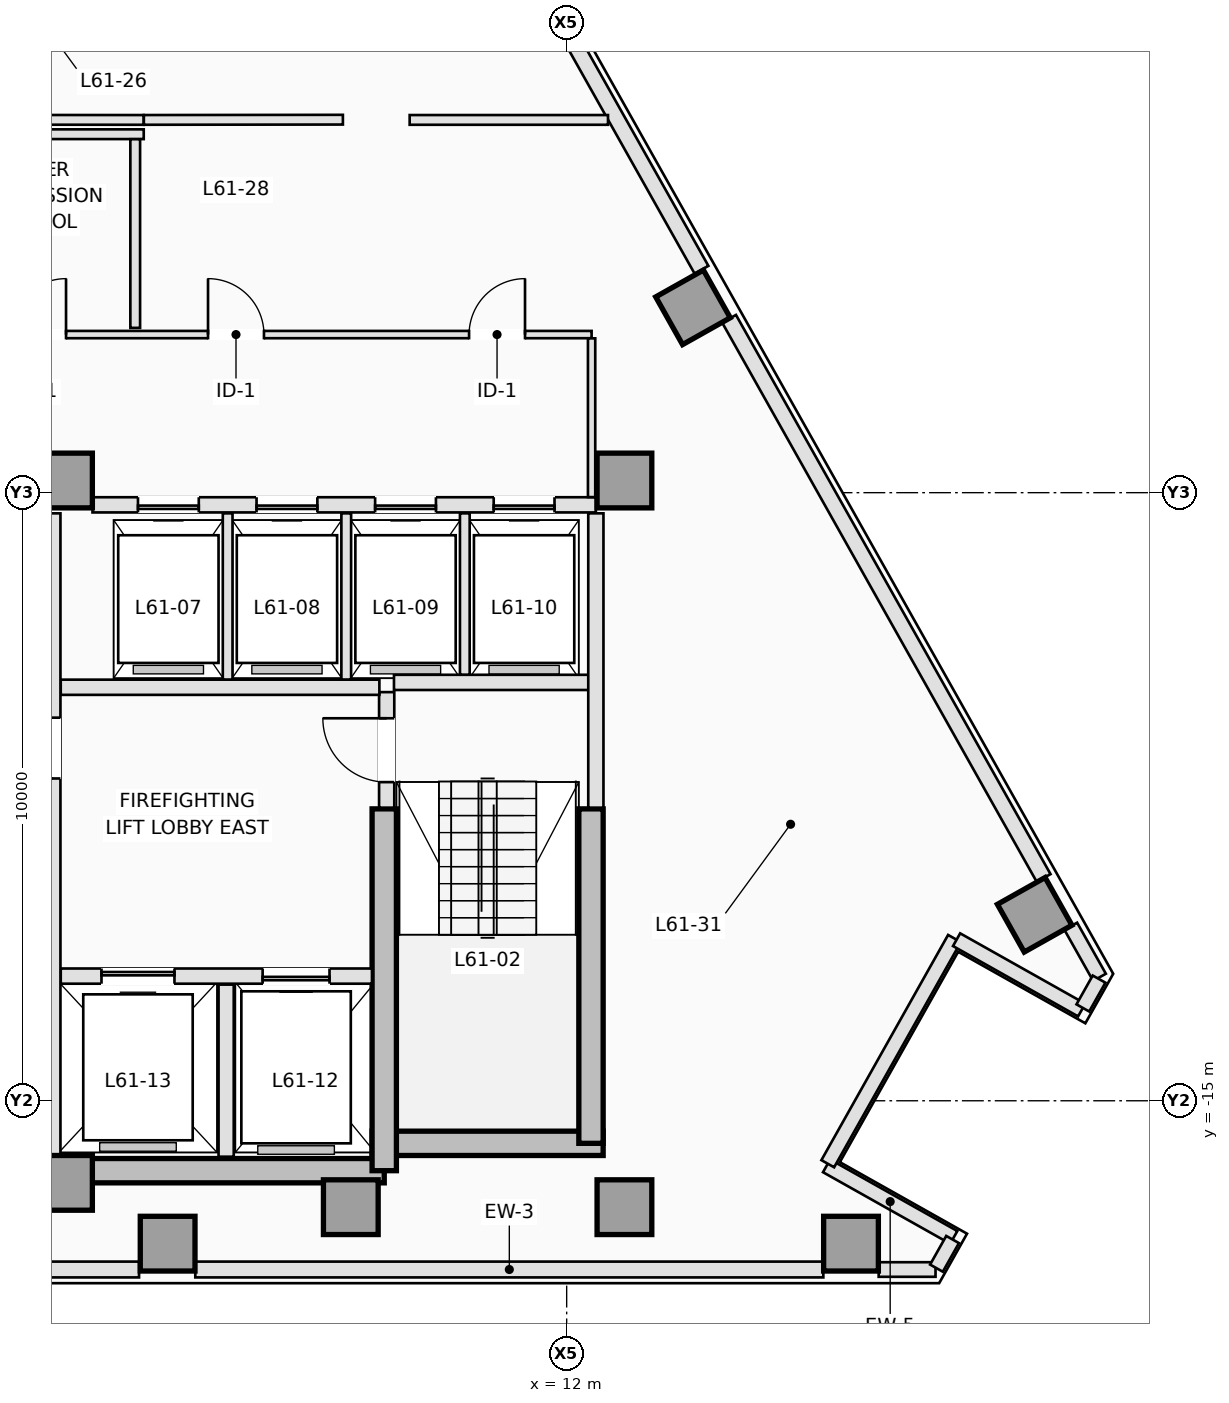
"""IFC4 building model, lengths in metres.
Left out: names, types, materials, properties, quantities, classifications, styles, units other than length and angle.
Written with IfcOpenShell. Run it as: python <this file> out.ifc"""

import sys

from ifc_helpers import new_model, si_unit, direction, frame, frame_2d, origin, origin_2d, place, context, subcontext, project, spatial, rectangle, extrude, element, fill, save


model = new_model("IFC4")
c1 = context("Model", 3, precision=1e-05, world=origin(), true_north=direction((0.0, 1.0)))
c2 = subcontext(c1, "Body", "Model", "MODEL_VIEW")
j1 = project(units=[si_unit("LENGTHUNIT", "METRE"), si_unit("PLANEANGLEUNIT", "RADIAN")], contexts=[c1])
p1 = place(None, origin())
s1 = spatial("IfcSite", under=j1, at=p1, CompositionType="ELEMENT")
p2 = place(p1, origin())
s2 = spatial("IfcBuilding", under=s1, at=p2, CompositionType="ELEMENT")
p3 = place(p2, frame((0.0, 0.0, 221.9)))
s3 = spatial("IfcBuildingStorey", under=s2, at=p3, CompositionType="ELEMENT", Elevation=221.9)
p4 = place(p3, frame((3.75, -16.15, 0.0), z_axis=(0.0, 0.0, 1.0), x_axis=(1.0, 0.0, 0.0)))
e1 = element("IfcWall", 1, at=p4, inside=s3, PredefinedType="SHEAR", context=c2, shape_type="SweptSolid", body=[
    extrude(rectangle(XDim=5.25, YDim=0.4, at=frame_2d((2.625, 0.0))), origin(), (0.0, 0.0, 1.0), 3.5),
])
p5 = place(p3, frame((8.8, -15.7, 0.0), z_axis=(0.0, 0.0, 1.0), x_axis=(1.0, 0.0, 0.0)))
e2 = element("IfcWall", 2, at=p5, inside=s3, PredefinedType="SHEAR", context=c2, shape_type="SweptSolid", body=[
    extrude(rectangle(XDim=3.8, YDim=0.4, at=frame_2d((1.9, 0.0))), origin(), (0.0, 0.0, 1.0), 3.5),
])
p6 = place(p3, frame((12.4, -15.7, 0.0), z_axis=(0.0, 0.0, 1.0), x_axis=(0.0, 1.0, 0.0)))
e3 = element("IfcWall", 3, at=p6, inside=s3, PredefinedType="SHEAR", context=c2, shape_type="SweptSolid", body=[
    extrude(rectangle(XDim=5.5, YDim=0.4, at=frame_2d((2.75, 0.0))), origin(), (0.0, 0.0, 1.0), 3.5),
])
p7 = place(p3, frame((9.0, -16.15, 0.0), z_axis=(0.0, 0.0, 1.0), x_axis=(0.0, 1.0, 0.0)))
e4 = element("IfcWall", 4, at=p7, inside=s3, PredefinedType="SHEAR", context=c2, shape_type="SweptSolid", body=[
    extrude(rectangle(XDim=5.95, YDim=0.4, at=frame_2d((2.975, 0.0))), origin(), (0.0, 0.0, 1.0), 3.5),
])
for number, where, z_axis, x_axis in (
    (5, (3.75, -16.35, 0.0), (0.0, 0.0, 1.0), (1.0, 0.0, 0.0)),
    (6, (8.45, -16.75, 0.0), (0.0, 0.0, 1.0), (1.0, 0.0, 0.0)),
    (7, (12.95, -16.75, 0.0), (0.0, 0.0, 1.0), (1.0, 0.0, 0.0)),
    (8, (3.75, -4.8, 0.0), (0.0, 0.0, 1.0), (1.0, 0.0, 0.0)),
    (9, (12.95, -4.8, 0.0), (0.0, 0.0, 1.0), (1.0, 0.0, 0.0)),
    (10, (5.438, -17.35, 0.0), (0.0, 0.0, 1.0), (0.0, 1.0, 0.0)),
    (11, (16.676, -17.35, 0.0), (0.0, 0.0, 1.0), (0.0, 1.0, 0.0)),
    (12, (19.697, -11.942, 0.0), (0.0, 0.0, 1.0), (0.872, 0.49, 0.0)),
    (13, (14.077, -1.952, 0.0), (0.0, 0.0, 1.0), (0.872, 0.49, 0.0)),
):
    element("IfcColumn", number, at=place(p3, frame(where, z_axis=z_axis, x_axis=x_axis)), inside=s3, PredefinedType="COLUMN", context=c2, shape_type="SweptSolid", body=[
        extrude(rectangle(XDim=0.9, YDim=0.9, at=origin_2d()), origin(), (0.0, 0.0, 1.0), 3.5),
    ])
p8 = place(p3, frame((18.066, -17.775, 0.0), z_axis=(0.0, 0.0, 1.0), x_axis=(-1.0, 0.0, 0.0)))
e14 = element("IfcWall", 14, at=p8, inside=s3, PredefinedType="STANDARD", context=c2, shape_type="SweptSolid", body=[
    extrude(rectangle(XDim=0.935, YDim=0.24, at=frame_2d((0.468, 0.0))), origin(), (0.0, 0.0, 1.0), 3.25),
])
p9 = place(p3, frame((16.221, -17.775, 0.0), z_axis=(0.0, 0.0, 1.0), x_axis=(-1.0, 0.0, 0.0)))
e15 = element("IfcWall", 15, at=p9, inside=s3, PredefinedType="STANDARD", context=c2, shape_type="SweptSolid", body=[
    extrude(rectangle(XDim=10.328, YDim=0.26, at=frame_2d((5.164, 0.0))), origin(), (0.0, 0.0, 1.0), 3.25),
])
p10 = place(p3, frame((4.968, -17.775, 0.0), z_axis=(0.0, 0.0, 1.0), x_axis=(-1.0, 0.0, 0.0)))
e16 = element("IfcWall", 16, at=p10, inside=s3, PredefinedType="STANDARD", context=c2, shape_type="SweptSolid", body=[
    extrude(rectangle(XDim=4.305, YDim=0.26, at=frame_2d((2.153, 0.0))), origin(), (0.0, 0.0, 1.0), 3.25),
])
p11 = place(p3, frame((20.29, -12.13, 0.0), z_axis=(0.0, 0.0, 1.0), x_axis=(0.490345412687, -0.87152818443, 0.0)))
e17 = element("IfcWall", 17, at=p11, inside=s3, PredefinedType="STANDARD", context=c2, shape_type="SweptSolid", body=[
    extrude(rectangle(XDim=0.964, YDim=0.24, at=frame_2d((0.482, 0.0))), origin(), (0.0, 0.0, 1.0), 3.25),
])
p12 = place(p3, frame((14.671, -2.14, 0.0), z_axis=(0.0, 0.0, 1.0), x_axis=(0.490246958575, -0.871583570066, 0.0)))
e18 = element("IfcWall", 18, at=p12, inside=s3, PredefinedType="STANDARD", context=c2, shape_type="SweptSolid", body=[
    extrude(rectangle(XDim=10.552, YDim=0.26, at=frame_2d((5.276, 0.0))), origin(), (0.0, 0.0, 1.0), 3.25),
])
p13 = place(p3, frame((12.066, 2.49, 0.0), z_axis=(0.0, 0.0, 1.0), x_axis=(0.490261239633, -0.871575537125, 0.0)))
e19 = element("IfcWall", 19, at=p13, inside=s3, PredefinedType="STANDARD", context=c2, shape_type="SweptSolid", body=[
    extrude(rectangle(XDim=4.388, YDim=0.26, at=frame_2d((2.194, 0.0))), origin(), (0.0, 0.0, 1.0), 3.25),
])
p14 = place(p3, frame((18.366, -17.247, 0.0), z_axis=(0.0, 0.0, 1.0), x_axis=(-0.871597270235, 0.490222600988, 0.0)))
e20 = element("IfcWall", 20, at=p14, inside=s3, PredefinedType="STANDARD", context=c2, shape_type="SweptSolid", body=[
    extrude(rectangle(XDim=2.4, YDim=0.24, at=frame_2d((1.2, 0.0))), origin(), (0.0, 0.0, 1.0), 3.25),
])
p15 = place(p3, frame((16.294, -16.035, 0.0), z_axis=(0.0, 0.0, 1.0), x_axis=(0.49027487746, 0.871567865706, 0.0)))
e21 = element("IfcWall", 21, at=p15, inside=s3, PredefinedType="STANDARD", context=c2, shape_type="SweptSolid", body=[
    extrude(rectangle(XDim=4.25, YDim=0.24, at=frame_2d((2.125, 0.0))), origin(), (0.0, 0.0, 1.0), 2.722),
])
p16 = place(p3, frame((18.412, -12.351, 0.0), z_axis=(0.0, 0.0, 1.0), x_axis=(0.871578299909, -0.490256327984, 0.0)))
e22 = element("IfcWall", 22, at=p16, inside=s3, PredefinedType="STANDARD", context=c2, shape_type="SweptSolid", body=[
    extrude(rectangle(XDim=2.36, YDim=0.24, at=frame_2d((1.18, 0.0))), origin(), (0.0, 0.0, 1.0), 3.25),
])
p17 = place(p3, frame((20.489, -13.473, 0.0), z_axis=(0.0, 0.0, 1.0), x_axis=(0.490133374867, 0.87164744871, 0.0)))
e23 = element("IfcWall", 23, at=p17, inside=s3, PredefinedType="STANDARD", context=c2, shape_type="SweptSolid", body=[
    extrude(rectangle(XDim=0.544, YDim=0.24, at=frame_2d((0.272, 0.0))), origin(), (0.0, 0.0, 1.0), 3.25),
])
p18 = place(p3, frame((18.081, -17.753, 0.0), z_axis=(0.0, 0.0, 1.0), x_axis=(0.490582915772, 0.871394516136, 0.0)))
e24 = element("IfcWall", 24, at=p18, inside=s3, PredefinedType="STANDARD", context=c2, shape_type="SweptSolid", body=[
    extrude(rectangle(XDim=0.541, YDim=0.24, at=frame_2d((0.27, 0.0))), origin(), (0.0, 0.0, 1.0), 3.25),
])
p19 = place(p3, frame((9.04, -10.18, 0.0), z_axis=(0.0, 0.0, 1.0), x_axis=(0.0, 1.0, 0.0)))
e25 = element("IfcWall", 25, at=p19, inside=s3, PredefinedType="PARTITIONING", context=c2, shape_type="SweptSolid", body=[
    extrude(rectangle(XDim=1.9, YDim=0.25, at=frame_2d((0.95, 0.0))), origin(), (0.0, 0.0, 1.0), 3.25),
])
p20 = place(p19, frame((0.42, 0.0, 0.0)))
e26 = element("IfcOpeningElement", 26, at=p20, cuts=e25, PredefinedType="OPENING", context=c2, shape_type="SweptSolid", body=[
    extrude(rectangle(XDim=1.05, YDim=2.15, at=frame_2d((0.525, 1.075))), frame((0.0, 0.135, 0.0), z_axis=(0.0, -1.0, 0.0), x_axis=(1.0, 0.0, 0.0)), (0.0, 0.0, 1.0), 0.27),
])
p21 = place(p3, frame((9.16, -8.12, 0.0), z_axis=(0.0, 0.0, 1.0), x_axis=(1.0, 0.0, 0.0)))
e27 = element("IfcWall", 27, at=p21, inside=s3, PredefinedType="PARTITIONING", context=c2, shape_type="SweptSolid", body=[
    extrude(rectangle(XDim=3.22, YDim=0.25, at=frame_2d((1.61, 0.0))), origin(), (0.0, 0.0, 1.0), 3.25),
])
p22 = place(p3, frame((12.48, -10.18, 0.0), z_axis=(0.0, 0.0, 1.0), x_axis=(0.0, 1.0, 0.0)))
e28 = element("IfcWall", 28, at=p22, inside=s3, PredefinedType="PARTITIONING", context=c2, shape_type="SweptSolid", body=[
    extrude(rectangle(XDim=4.84, YDim=0.25, at=frame_2d((2.42, 0.0))), origin(), (0.0, 0.0, 1.0), 3.25),
])
p23 = place(p3, frame((3.68, -12.95, 0.0), z_axis=(0.0, 0.0, 1.0), x_axis=(1.0, 0.0, 0.0)))
e29 = element("IfcWall", 29, at=p23, inside=s3, PredefinedType="PARTITIONING", context=c2, shape_type="SweptSolid", body=[
    extrude(rectangle(XDim=5.118, YDim=0.25, at=frame_2d((2.559, 0.0))), origin(), (0.0, 0.0, 1.0), 3.25),
])
p24 = place(p23, frame((3.32, 0.0, 0.0)))
e30 = element("IfcOpeningElement", 30, at=p24, cuts=e29, PredefinedType="OPENING", context=c2, shape_type="SweptSolid", body=[
    extrude(rectangle(XDim=1.1, YDim=2.15, at=frame_2d((0.55, 1.075))), frame((0.0, 0.135, 0.0), z_axis=(0.0, -1.0, 0.0), x_axis=(1.0, 0.0, 0.0)), (0.0, 0.0, 1.0), 0.27),
])
p25 = place(p23, frame((0.67, 0.0, 0.0)))
e31 = element("IfcOpeningElement", 31, at=p25, cuts=e29, PredefinedType="OPENING", context=c2, shape_type="SweptSolid", body=[
    extrude(rectangle(XDim=1.2, YDim=2.15, at=frame_2d((0.6, 1.075))), frame((0.0, 0.135, 0.0), z_axis=(0.0, -1.0, 0.0), x_axis=(1.0, 0.0, 0.0)), (0.0, 0.0, 1.0), 0.27),
])
p26 = place(p3, frame((6.4, -15.92, 0.0), z_axis=(0.0, 0.0, 1.0), x_axis=(0.0, 1.0, 0.0)))
e32 = element("IfcWall", 32, at=p26, inside=s3, PredefinedType="PARTITIONING", context=c2, shape_type="SweptSolid", body=[
    extrude(rectangle(XDim=2.83, YDim=0.25, at=frame_2d((1.415, 0.0))), origin(), (0.0, 0.0, 1.0), 3.25),
])
p27 = place(p3, frame((3.68, -8.2, 0.0), z_axis=(0.0, 0.0, 1.0), x_axis=(1.0, 0.0, 0.0)))
e33 = element("IfcWall", 33, at=p27, inside=s3, PredefinedType="PARTITIONING", context=c2, shape_type="SweptSolid", body=[
    extrude(rectangle(XDim=5.24, YDim=0.25, at=frame_2d((2.62, 0.0))), origin(), (0.0, 0.0, 1.0), 3.25),
])
p28 = place(p3, frame((3.55, -15.898, 0.0), z_axis=(0.0, 0.0, 1.0), x_axis=(0.0, 1.0, 0.0)))
e34 = element("IfcWall", 34, at=p28, inside=s3, PredefinedType="PARTITIONING", context=c2, shape_type="SweptSolid", body=[
    extrude(rectangle(XDim=10.558, YDim=0.25, at=frame_2d((5.279, 0.0))), origin(), (0.0, 0.0, 1.0), 3.25),
])
p29 = place(p28, frame((6.198, 0.0, 0.0)))
e35 = element("IfcOpeningElement", 35, at=p29, cuts=e34, PredefinedType="OPENING", context=c2, shape_type="SweptSolid", body=[
    extrude(rectangle(XDim=1.0, YDim=2.15, at=frame_2d((0.5, 1.075))), frame((0.0, 0.135, 0.0), z_axis=(0.0, -1.0, 0.0), x_axis=(1.0, 0.0, 0.0)), (0.0, 0.0, 1.0), 0.27),
])
p30 = place(p3, frame((4.202, -5.2, 0.0), z_axis=(0.0, 0.0, 1.0), x_axis=(1.0, 0.0, 0.0)))
e36 = element("IfcWall", 36, at=p30, inside=s3, PredefinedType="PARTITIONING", context=c2, shape_type="SweptSolid", body=[
    extrude(rectangle(XDim=8.278, YDim=0.25, at=frame_2d((4.139, 0.0))), origin(), (0.0, 0.0, 1.0), 3.25),
])
p31 = place(p30, frame((0.748, 0.0, 0.0)))
e37 = element("IfcOpeningElement", 37, at=p31, cuts=e36, PredefinedType="OPENING", context=c2, shape_type="SweptSolid", body=[
    extrude(rectangle(XDim=1.0, YDim=2.15, at=frame_2d((0.5, 1.075))), frame((0.0, 0.135, 0.0), z_axis=(0.0, -1.0, 0.0), x_axis=(1.0, 0.0, 0.0)), (0.0, 0.0, 1.0), 0.27),
])
p32 = place(p30, frame((2.698, 0.0, 0.0)))
e38 = element("IfcOpeningElement", 38, at=p32, cuts=e36, PredefinedType="OPENING", context=c2, shape_type="SweptSolid", body=[
    extrude(rectangle(XDim=1.0, YDim=2.15, at=frame_2d((0.5, 1.075))), frame((0.0, 0.135, 0.0), z_axis=(0.0, -1.0, 0.0), x_axis=(1.0, 0.0, 0.0)), (0.0, 0.0, 1.0), 0.27),
])
p33 = place(p30, frame((4.648, 0.0, 0.0)))
e39 = element("IfcOpeningElement", 39, at=p33, cuts=e36, PredefinedType="OPENING", context=c2, shape_type="SweptSolid", body=[
    extrude(rectangle(XDim=1.0, YDim=2.15, at=frame_2d((0.5, 1.075))), frame((0.0, 0.135, 0.0), z_axis=(0.0, -1.0, 0.0), x_axis=(1.0, 0.0, 0.0)), (0.0, 0.0, 1.0), 0.27),
])
p34 = place(p30, frame((6.598, 0.0, 0.0)))
e40 = element("IfcOpeningElement", 40, at=p34, cuts=e36, PredefinedType="OPENING", context=c2, shape_type="SweptSolid", body=[
    extrude(rectangle(XDim=1.0, YDim=2.15, at=frame_2d((0.5, 1.075))), frame((0.0, 0.135, 0.0), z_axis=(0.0, -1.0, 0.0), x_axis=(1.0, 0.0, 0.0)), (0.0, 0.0, 1.0), 0.27),
])
for number, where, z_axis, x_axis in (
    (41, (6.425, -8.073, 0.0), (0.0, 0.0, 1.0), (0.0, 1.0, 0.0)),
    (42, (8.375, -8.073, 0.0), (0.0, 0.0, 1.0), (0.0, 1.0, 0.0)),
):
    element("IfcWall", number, at=place(p3, frame(where, z_axis=z_axis, x_axis=x_axis)), inside=s3, PredefinedType="PARTITIONING", context=c2, shape_type="SweptSolid", body=[
        extrude(rectangle(XDim=2.733, YDim=0.16, at=frame_2d((1.366, 0.0))), origin(), (0.0, 0.0, 1.0), 3.25),
    ])
p35 = place(p3, frame((10.325, -7.993, 0.0), z_axis=(0.0, 0.0, 1.0), x_axis=(0.0, 1.0, 0.0)))
e43 = element("IfcWall", 43, at=p35, inside=s3, PredefinedType="PARTITIONING", context=c2, shape_type="SweptSolid", body=[
    extrude(rectangle(XDim=2.653, YDim=0.16, at=frame_2d((1.326, 0.0))), origin(), (0.0, 0.0, 1.0), 3.25),
])
p36 = place(p3, frame((1.512, -2.4, 0.0), z_axis=(0.0, 0.0, 1.0), x_axis=(1.0, 0.0, 0.0)))
e44 = element("IfcWall", 44, at=p36, inside=s3, PredefinedType="PARTITIONING", context=c2, shape_type="SweptSolid", body=[
    extrude(rectangle(XDim=10.898, YDim=0.12, at=frame_2d((5.449, 0.0))), origin(), (0.0, 0.0, 1.0), 2.943),
])
p37 = place(p36, frame((4.59, 0.0, 0.0)))
e45 = element("IfcOpeningElement", 45, at=p37, cuts=e44, PredefinedType="OPENING", context=c2, shape_type="SweptSolid", body=[
    extrude(rectangle(XDim=0.92, YDim=2.12, at=frame_2d((0.46, 1.06))), frame((0.0, 0.07, 0.0), z_axis=(0.0, -1.0, 0.0), x_axis=(1.0, 0.0, 0.0)), (0.0, 0.0, 1.0), 0.14),
])
p38 = place(p36, frame((1.335, 0.0, 0.0)))
e46 = element("IfcOpeningElement", 46, at=p38, cuts=e44, PredefinedType="OPENING", context=c2, shape_type="SweptSolid", body=[
    extrude(rectangle(XDim=0.92, YDim=2.12, at=frame_2d((0.46, 1.06))), frame((0.0, 0.07, 0.0), z_axis=(0.0, -1.0, 0.0), x_axis=(1.0, 0.0, 0.0)), (0.0, 0.0, 1.0), 0.14),
])
p39 = place(p36, frame((8.883, 0.0, 0.0)))
e47 = element("IfcOpeningElement", 47, at=p39, cuts=e44, PredefinedType="OPENING", context=c2, shape_type="SweptSolid", body=[
    extrude(rectangle(XDim=0.92, YDim=2.12, at=frame_2d((0.46, 1.06))), frame((0.0, 0.07, 0.0), z_axis=(0.0, -1.0, 0.0), x_axis=(1.0, 0.0, 0.0)), (0.0, 0.0, 1.0), 0.14),
])
p40 = place(p3, frame((12.41, -2.462, 0.0), z_axis=(0.0, 0.0, 1.0), x_axis=(0.0, -1.0, 0.0)))
e48 = element("IfcWall", 48, at=p40, inside=s3, PredefinedType="PARTITIONING", context=c2, shape_type="SweptSolid", body=[
    extrude(rectangle(XDim=2.611, YDim=0.12, at=frame_2d((1.306, 0.0))), origin(), (0.0, 0.0, 1.0), 3.25),
])
p41 = place(p3, frame((5.045, 1.13, 0.0), z_axis=(0.0, 0.0, 1.0), x_axis=(-0.999999801196, 0.000630561074, 0.0)))
e49 = element("IfcWall", 49, at=p41, inside=s3, PredefinedType="PARTITIONING", context=c2, shape_type="SweptSolid", body=[
    extrude(rectangle(XDim=3.485, YDim=0.16, at=frame_2d((1.742, 0.0))), origin(), (0.0, 0.0, 1.0), 3.25),
])
p42 = place(p3, frame((8.32, 1.134, 0.0), z_axis=(0.0, 0.0, 1.0), x_axis=(-0.999999374216, -0.001118734383, 0.0)))
e50 = element("IfcWall", 50, at=p42, inside=s3, PredefinedType="PARTITIONING", context=c2, shape_type="SweptSolid", body=[
    extrude(rectangle(XDim=3.273, YDim=0.16, at=frame_2d((1.637, 0.0))), origin(), (0.0, 0.0, 1.0), 3.25),
])
p43 = place(p3, frame((12.68, 1.13, 0.0), z_axis=(0.0, 0.0, 1.0), x_axis=(-1.0, 0.0, 0.0)))
e51 = element("IfcWall", 51, at=p43, inside=s3, PredefinedType="PARTITIONING", context=c2, shape_type="SweptSolid", body=[
    extrude(rectangle(XDim=3.262, YDim=0.16, at=frame_2d((1.631, 0.0))), origin(), (0.0, 0.0, 1.0), 3.25),
])
p44 = place(p3, frame((5.045, 0.895, 0.0), z_axis=(0.0, 0.0, 1.0), x_axis=(-1.0, 0.0, 0.0)))
e52 = element("IfcWall", 52, at=p44, inside=s3, PredefinedType="PARTITIONING", context=c2, shape_type="SweptSolid", body=[
    extrude(rectangle(XDim=3.485, YDim=0.16, at=frame_2d((1.742, 0.0))), origin(), (0.0, 0.0, 1.0), 3.25),
])
p45 = place(p3, frame((4.905, -2.29, 0.0), z_axis=(0.0, 0.0, 1.0), x_axis=(0.0, 1.0, 0.0)))
e53 = element("IfcWall", 53, at=p45, inside=s3, PredefinedType="PARTITIONING", context=c2, shape_type="SweptSolid", body=[
    extrude(rectangle(XDim=3.103, YDim=0.16, at=frame_2d((1.551, 0.0))), origin(), (0.0, 0.0, 1.0), 3.25),
])
p46 = place(p31, origin())
e54 = element("IfcDoor", 54, at=p46, inside=s3, OperationType="SLIDING_TO_RIGHT", PredefinedType="DOOR", context=c2, shape_type="SweptSolid", body=[
    extrude(rectangle(XDim=1.0, YDim=2.15, at=frame_2d((0.5, 1.075))), frame((0.0, 0.025, 0.0), z_axis=(0.0, -1.0, 0.0), x_axis=(1.0, 0.0, 0.0)), (0.0, 0.0, 1.0), 0.05),
])
fill(e37, e54)
p47 = place(p32, origin())
e55 = element("IfcDoor", 55, at=p47, inside=s3, OperationType="SLIDING_TO_RIGHT", PredefinedType="DOOR", context=c2, shape_type="SweptSolid", body=[
    extrude(rectangle(XDim=1.0, YDim=2.15, at=frame_2d((0.5, 1.075))), frame((0.0, 0.025, 0.0), z_axis=(0.0, -1.0, 0.0), x_axis=(1.0, 0.0, 0.0)), (0.0, 0.0, 1.0), 0.05),
])
fill(e38, e55)
p48 = place(p33, origin())
e56 = element("IfcDoor", 56, at=p48, inside=s3, OperationType="SLIDING_TO_RIGHT", PredefinedType="DOOR", context=c2, shape_type="SweptSolid", body=[
    extrude(rectangle(XDim=1.0, YDim=2.15, at=frame_2d((0.5, 1.075))), frame((0.0, 0.025, 0.0), z_axis=(0.0, -1.0, 0.0), x_axis=(1.0, 0.0, 0.0)), (0.0, 0.0, 1.0), 0.05),
])
fill(e39, e56)
p49 = place(p34, origin())
e57 = element("IfcDoor", 57, at=p49, inside=s3, OperationType="SLIDING_TO_RIGHT", PredefinedType="DOOR", context=c2, shape_type="SweptSolid", body=[
    extrude(rectangle(XDim=1.0, YDim=2.15, at=frame_2d((0.5, 1.075))), frame((0.0, 0.025, 0.0), z_axis=(0.0, -1.0, 0.0), x_axis=(1.0, 0.0, 0.0)), (0.0, 0.0, 1.0), 0.05),
])
fill(e40, e57)
p50 = place(p24, origin())
e58 = element("IfcDoor", 58, at=p50, inside=s3, OperationType="SLIDING_TO_RIGHT", PredefinedType="DOOR", context=c2, shape_type="SweptSolid", body=[
    extrude(rectangle(XDim=1.1, YDim=2.15, at=frame_2d((0.55, 1.075))), frame((0.0, 0.025, 0.0), z_axis=(0.0, -1.0, 0.0), x_axis=(1.0, 0.0, 0.0)), (0.0, 0.0, 1.0), 0.05),
])
fill(e30, e58)
p51 = place(p25, origin())
e59 = element("IfcDoor", 59, at=p51, inside=s3, OperationType="SLIDING_TO_LEFT", PredefinedType="DOOR", context=c2, shape_type="SweptSolid", body=[
    extrude(rectangle(XDim=1.2, YDim=2.15, at=frame_2d((0.6, 1.075))), frame((0.0, 0.025, 0.0), z_axis=(0.0, -1.0, 0.0), x_axis=(1.0, 0.0, 0.0)), (0.0, 0.0, 1.0), 0.05),
])
fill(e31, e59)
p52 = place(p20, origin())
e60 = element("IfcDoor", 60, at=p52, inside=s3, OperationType="SINGLE_SWING_RIGHT", PredefinedType="DOOR", context=c2, shape_type="SweptSolid", body=[
    extrude(rectangle(XDim=1.05, YDim=2.15, at=frame_2d((0.525, 1.075))), frame((0.0, 0.025, 0.0), z_axis=(0.0, -1.0, 0.0), x_axis=(1.0, 0.0, 0.0)), (0.0, 0.0, 1.0), 0.05),
])
fill(e26, e60)
p53 = place(p29, origin())
e61 = element("IfcDoor", 61, at=p53, inside=s3, OperationType="SINGLE_SWING_LEFT", PredefinedType="DOOR", context=c2, shape_type="SweptSolid", body=[
    extrude(rectangle(XDim=1.0, YDim=2.15, at=frame_2d((0.5, 1.075))), frame((0.0, 0.025, 0.0), z_axis=(0.0, -1.0, 0.0), x_axis=(1.0, 0.0, 0.0)), (0.0, 0.0, 1.0), 0.05),
])
fill(e35, e61)
p54 = place(p37, origin())
e62 = element("IfcDoor", 62, at=p54, inside=s3, OperationType="SINGLE_SWING_LEFT", PredefinedType="DOOR", context=c2, shape_type="SweptSolid", body=[
    extrude(rectangle(XDim=0.92, YDim=2.12, at=frame_2d((0.46, 1.06))), frame((0.0, 0.025, 0.0), z_axis=(0.0, -1.0, 0.0), x_axis=(1.0, 0.0, 0.0)), (0.0, 0.0, 1.0), 0.05),
])
fill(e45, e62)
p55 = place(p38, origin())
e63 = element("IfcDoor", 63, at=p55, inside=s3, OperationType="SINGLE_SWING_RIGHT", PredefinedType="DOOR", context=c2, shape_type="SweptSolid", body=[
    extrude(rectangle(XDim=0.92, YDim=2.12, at=frame_2d((0.46, 1.06))), frame((0.0, 0.025, 0.0), z_axis=(0.0, -1.0, 0.0), x_axis=(1.0, 0.0, 0.0)), (0.0, 0.0, 1.0), 0.05),
])
fill(e46, e63)
p56 = place(p39, origin())
e64 = element("IfcDoor", 64, at=p56, inside=s3, OperationType="SINGLE_SWING_RIGHT", PredefinedType="DOOR", context=c2, shape_type="SweptSolid", body=[
    extrude(rectangle(XDim=0.92, YDim=2.12, at=frame_2d((0.46, 1.06))), frame((0.0, 0.025, 0.0), z_axis=(0.0, -1.0, 0.0), x_axis=(1.0, 0.0, 0.0)), (0.0, 0.0, 1.0), 0.05),
])
fill(e47, e64)
save(model, sys.argv[1])
